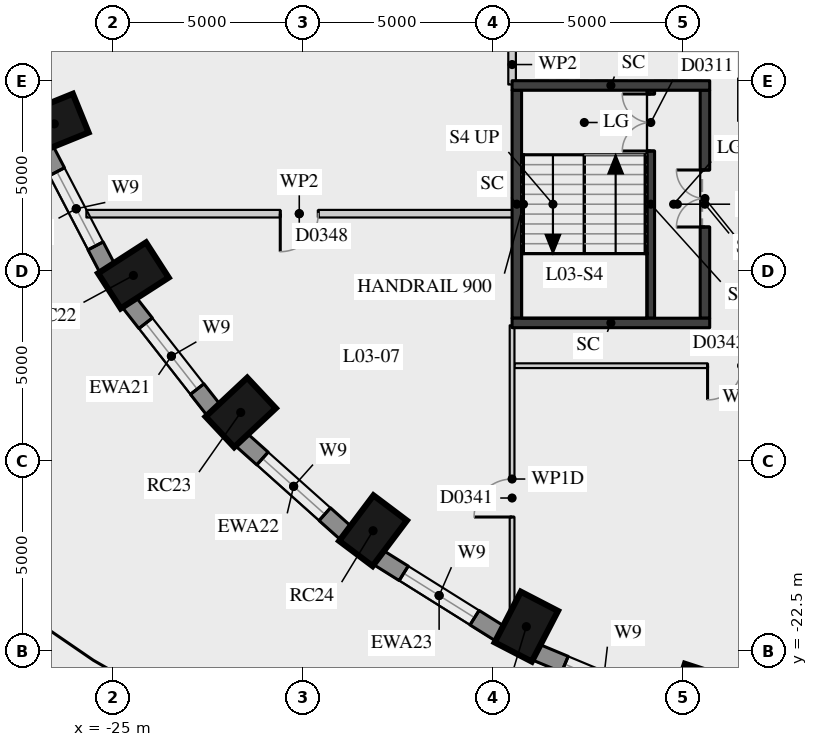
"""IFC4 building model, lengths in metres.
Left out: names, types, materials, properties, quantities, classifications, styles, units other than length and angle.
Written with IfcOpenShell. Run it as: python <this file> out.ifc"""

import sys

from ifc_helpers import new_model, si_unit, direction, frame, frame_2d, origin, origin_2d, place, context, subcontext, project, spatial, rectangle, extrude, element, fill, save


model = new_model("IFC4")
c1 = context("Model", 3, precision=1e-05, world=origin(), true_north=direction((0.0, 1.0)))
c2 = subcontext(c1, "Body", "Model", "MODEL_VIEW")
j1 = project(units=[si_unit("LENGTHUNIT", "METRE"), si_unit("PLANEANGLEUNIT", "RADIAN")], contexts=[c1])
p1 = place(None, origin())
s1 = spatial("IfcSite", under=j1, at=p1, CompositionType="ELEMENT")
p2 = place(p1, origin())
s2 = spatial("IfcBuilding", under=s1, at=p2, CompositionType="ELEMENT")
p3 = place(p2, frame((0.0, 0.0, 17.5)))
s3 = spatial("IfcBuildingStorey", under=s2, at=p3, CompositionType="ELEMENT", Elevation=17.5)
for number, where, z_axis, x_axis in (
    (1, (-26.546, -8.636, 0.0), (0.0, 0.0, 1.0), (-0.927, -0.376, 0.0)),
    (2, (-24.465, -12.625, 0.0), (0.0, 0.0, 1.0), (-0.841, -0.541, 0.0)),
    (3, (-21.641, -16.23, 0.0), (0.0, 0.0, 1.0), (-0.73, -0.683, 0.0)),
    (4, (-18.159, -19.343, 0.0), (0.0, 0.0, 1.0), (-0.601, -0.799, 0.0)),
    (5, (-14.125, -21.867, 0.0), (0.0, 0.0, 1.0), (-0.46, -0.888, 0.0)),
    (6, (-9.662, -23.727, 0.0), (0.0, 0.0, 1.0), (-0.31, -0.951, 0.0)),
):
    element("IfcColumn", number, at=place(p3, frame(where, z_axis=z_axis, x_axis=x_axis)), inside=s3, PredefinedType="COLUMN", context=c2, shape_type="SweptSolid", body=[
        extrude(rectangle(XDim=1.5, YDim=1.1, at=origin_2d()), origin(), (0.0, 0.0, 1.0), 4.2),
    ])
p4 = place(p3, frame((-26.786, -9.305, 0.0), z_axis=(0.0, 0.0, 1.0), x_axis=(0.462492775226, -0.886623050041, 0.0)))
e7 = element("IfcWall", 7, at=p4, inside=s3, PredefinedType="SOLIDWALL", context=c2, shape_type="SweptSolid", body=[
    extrude(rectangle(XDim=3.532, YDim=0.45, at=frame_2d((1.766, 0.0))), origin(), (0.0, 0.0, 1.0), 3.92),
])
p5 = place(p4, frame((0.666, 0.0, 0.4)))
e8 = element("IfcOpeningElement", 8, at=p5, cuts=e7, PredefinedType="OPENING", context=c2, shape_type="SweptSolid", body=[
    extrude(rectangle(XDim=2.2, YDim=2.8, at=frame_2d((1.1, 1.4))), frame((0.0, 0.235, 0.0), z_axis=(0.0, -1.0, 0.0), x_axis=(1.0, 0.0, 0.0)), (0.0, 0.0, 1.0), 0.47),
])
p6 = place(p3, frame((-24.578, -13.328, 0.0), z_axis=(0.0, 0.0, 1.0), x_axis=(0.616661975264, -0.787228053529, 0.0)))
e9 = element("IfcWall", 9, at=p6, inside=s3, PredefinedType="SOLIDWALL", context=c2, shape_type="SweptSolid", body=[
    extrude(rectangle(XDim=3.61, YDim=0.45, at=frame_2d((1.805, 0.0))), origin(), (0.0, 0.0, 1.0), 3.92),
])
p7 = place(p6, frame((0.705, 0.0, 0.4)))
e10 = element("IfcOpeningElement", 10, at=p7, cuts=e9, PredefinedType="OPENING", context=c2, shape_type="SweptSolid", body=[
    extrude(rectangle(XDim=2.2, YDim=2.8, at=frame_2d((1.1, 1.4))), frame((0.0, 0.235, 0.0), z_axis=(0.0, -1.0, 0.0), x_axis=(1.0, 0.0, 0.0)), (0.0, 0.0, 1.0), 0.47),
])
p8 = place(p3, frame((-21.627, -16.943, 0.0), z_axis=(0.0, 0.0, 1.0), x_axis=(0.745526233716, -0.66647628228, 0.0)))
e11 = element("IfcWall", 11, at=p8, inside=s3, PredefinedType="SOLIDWALL", context=c2, shape_type="SweptSolid", body=[
    extrude(rectangle(XDim=3.697, YDim=0.45, at=frame_2d((1.848, 0.0))), origin(), (0.0, 0.0, 1.0), 3.92),
])
p9 = place(p8, frame((0.749, 0.0, 0.4)))
e12 = element("IfcOpeningElement", 12, at=p9, cuts=e11, PredefinedType="OPENING", context=c2, shape_type="SweptSolid", body=[
    extrude(rectangle(XDim=2.2, YDim=2.8, at=frame_2d((1.1, 1.4))), frame((0.0, 0.235, 0.0), z_axis=(0.0, -1.0, 0.0), x_axis=(1.0, 0.0, 0.0)), (0.0, 0.0, 1.0), 0.47),
])
p10 = place(p3, frame((-18.023, -20.044, 0.0), z_axis=(0.0, 0.0, 1.0), x_axis=(0.847635480093, -0.530579016629, 0.0)))
e13 = element("IfcWall", 13, at=p10, inside=s3, PredefinedType="SOLIDWALL", context=c2, shape_type="SweptSolid", body=[
    extrude(rectangle(XDim=3.782, YDim=0.45, at=frame_2d((1.891, 0.0))), origin(), (0.0, 0.0, 1.0), 3.92),
])
p11 = place(p10, frame((0.791, 0.0, 0.4)))
e14 = element("IfcOpeningElement", 14, at=p11, cuts=e13, PredefinedType="OPENING", context=c2, shape_type="SweptSolid", body=[
    extrude(rectangle(XDim=2.2, YDim=2.8, at=frame_2d((1.1, 1.4))), frame((0.0, 0.235, 0.0), z_axis=(0.0, -1.0, 0.0), x_axis=(1.0, 0.0, 0.0)), (0.0, 0.0, 1.0), 0.47),
])
p12 = place(p3, frame((-13.875, -22.537, 0.0), z_axis=(0.0, 0.0, 1.0), x_axis=(0.923031964282, -0.384723267966, 0.0)))
e15 = element("IfcWall", 15, at=p12, inside=s3, PredefinedType="SOLIDWALL", context=c2, shape_type="SweptSolid", body=[
    extrude(rectangle(XDim=3.856, YDim=0.45, at=frame_2d((1.928, 0.0))), origin(), (0.0, 0.0, 1.0), 3.92),
])
p13 = place(p12, frame((0.828, 0.0, 0.4)))
e16 = element("IfcOpeningElement", 16, at=p13, cuts=e15, PredefinedType="OPENING", context=c2, shape_type="SweptSolid", body=[
    extrude(rectangle(XDim=2.2, YDim=2.8, at=frame_2d((1.1, 1.4))), frame((0.0, 0.235, 0.0), z_axis=(0.0, -1.0, 0.0), x_axis=(1.0, 0.0, 0.0)), (0.0, 0.0, 1.0), 0.47),
])
p14 = place(p3, frame((-10.85, -13.75, 0.0), z_axis=(0.0, 0.0, 1.0), x_axis=(0.0, 1.0, 0.0)))
e17 = element("IfcWall", 17, at=p14, inside=s3, PredefinedType="SHEAR", context=c2, shape_type="SweptSolid", body=[
    extrude(rectangle(XDim=6.0, YDim=0.2, at=frame_2d((3.0, 0.0))), origin(), (0.0, 0.0, 1.0), 3.92),
])
p15 = place(p14, frame((4.4, 0.0, 0.0)))
e18 = element("IfcOpeningElement", 18, at=p15, cuts=e17, PredefinedType="OPENING", context=c2, shape_type="SweptSolid", body=[
    extrude(rectangle(XDim=1.5, YDim=2.1, at=frame_2d((0.75, 1.05))), frame((0.0, 0.11, 0.0), z_axis=(0.0, -1.0, 0.0), x_axis=(1.0, 0.0, 0.0)), (0.0, 0.0, 1.0), 0.22),
])
p16 = place(p3, frame((-14.375, -13.75, -0.35), z_axis=(0.0, 0.0, 1.0), x_axis=(0.0, 1.0, 0.0)))
e19 = element("IfcWall", 19, at=p16, inside=s3, PredefinedType="SHEAR", context=c2, shape_type="SweptSolid", body=[
    extrude(rectangle(XDim=6.0, YDim=0.25, at=frame_2d((3.0, 0.0))), origin(), (0.0, 0.0, 1.0), 4.27),
])
p17 = place(p3, frame((-9.425, -13.75, -0.35), z_axis=(0.0, 0.0, 1.0), x_axis=(0.0, 1.0, 0.0)))
e20 = element("IfcWall", 20, at=p17, inside=s3, PredefinedType="SHEAR", context=c2, shape_type="SweptSolid", body=[
    extrude(rectangle(XDim=6.0, YDim=0.25, at=frame_2d((3.0, 0.0))), origin(), (0.0, 0.0, 1.0), 4.27),
])
p18 = place(p17, frame((2.4, 0.0, 0.35)))
e21 = element("IfcOpeningElement", 21, at=p18, cuts=e20, PredefinedType="OPENING", context=c2, shape_type="SweptSolid", body=[
    extrude(rectangle(XDim=1.5, YDim=2.1, at=frame_2d((0.75, 1.05))), frame((0.0, 0.135, 0.0), z_axis=(0.0, -1.0, 0.0), x_axis=(1.0, 0.0, 0.0)), (0.0, 0.0, 1.0), 0.27),
])
for number, where, z_axis, x_axis in (
    (22, (-14.5, -7.625, -0.35), (0.0, 0.0, 1.0), (1.0, 0.0, 0.0)),
    (23, (-14.5, -13.875, -0.35), (0.0, 0.0, 1.0), (1.0, 0.0, 0.0)),
):
    element("IfcWall", number, at=place(p3, frame(where, z_axis=z_axis, x_axis=x_axis)), inside=s3, PredefinedType="SHEAR", context=c2, shape_type="SweptSolid", body=[
        extrude(rectangle(XDim=5.2, YDim=0.25, at=frame_2d((2.6, 0.0))), origin(), (0.0, 0.0, 1.0), 4.27),
    ])
p19 = place(p3, frame((-14.438, -15.0, 0.0), z_axis=(0.0, 0.0, 1.0), x_axis=(1.0, 0.0, 0.0)))
e24 = element("IfcWall", 24, at=p19, inside=s3, PredefinedType="PARTITIONING", context=c2, shape_type="SweptSolid", body=[
    extrude(rectangle(XDim=11.962, YDim=0.125, at=frame_2d((5.981, 0.0))), origin(), (0.0, 0.0, 1.0), 3.92),
])
p20 = place(p19, frame((5.082, 0.0, 0.0)))
e25 = element("IfcOpeningElement", 25, at=p20, cuts=e24, PredefinedType="OPENING", context=c2, shape_type="SweptSolid", body=[
    extrude(rectangle(XDim=1.8, YDim=2.1, at=frame_2d((0.9, 1.05))), frame((0.0, 0.073, 0.0), z_axis=(0.0, -1.0, 0.0), x_axis=(1.0, 0.0, 0.0)), (0.0, 0.0, 1.0), 0.145),
])
p21 = place(p3, frame((-25.702, -11.0, 0.0), z_axis=(0.0, 0.0, 1.0), x_axis=(1.0, 0.0, 0.0)))
e26 = element("IfcWall", 26, at=p21, inside=s3, PredefinedType="PARTITIONING", context=c2, shape_type="SweptSolid", body=[
    extrude(rectangle(XDim=11.204, YDim=0.2, at=frame_2d((5.602, 0.0))), origin(), (0.0, 0.0, 1.0), 3.92),
])
p22 = place(p21, frame((5.102, 0.0, 0.0)))
e27 = element("IfcOpeningElement", 27, at=p22, cuts=e26, PredefinedType="OPENING", context=c2, shape_type="SweptSolid", body=[
    extrude(rectangle(XDim=1.0, YDim=2.1, at=frame_2d((0.5, 1.05))), frame((0.0, 0.11, 0.0), z_axis=(0.0, -1.0, 0.0), x_axis=(1.0, 0.0, 0.0)), (0.0, 0.0, 1.0), 0.22),
])
p23 = place(p3, frame((-14.5, -22.027, 0.0), z_axis=(0.0, 0.0, 1.0), x_axis=(0.0, 1.0, 0.0)))
e28 = element("IfcWall", 28, at=p23, inside=s3, PredefinedType="PARTITIONING", context=c2, shape_type="SweptSolid", body=[
    extrude(rectangle(XDim=8.089, YDim=0.125, at=frame_2d((4.045, 0.0))), origin(), (0.0, 0.0, 1.0), 3.47),
])
p24 = place(p23, frame((3.045, 0.0, 0.0)))
e29 = element("IfcOpeningElement", 29, at=p24, cuts=e28, PredefinedType="OPENING", context=c2, shape_type="SweptSolid", body=[
    extrude(rectangle(XDim=1.0, YDim=2.1, at=frame_2d((0.5, 1.05))), frame((0.0, 0.073, 0.0), z_axis=(0.0, -1.0, 0.0), x_axis=(1.0, 0.0, 0.0)), (0.0, 0.0, 1.0), 0.145),
])
p25 = place(p3, frame((-14.5, -7.6, 0.0), z_axis=(0.0, 0.0, 1.0), x_axis=(0.0, 1.0, 0.0)))
e30 = element("IfcWall", 30, at=p25, inside=s3, PredefinedType="PARTITIONING", context=c2, shape_type="SweptSolid", body=[
    extrude(rectangle(XDim=1.05, YDim=0.2, at=frame_2d((0.525, 0.0))), origin(), (0.0, 0.0, 1.0), 3.92),
])
p26 = place(p5, origin())
e31 = element("IfcWindow", 31, at=p26, inside=s3, PartitioningType="SINGLE_PANEL", PredefinedType="WINDOW", context=c2, shape_type="SweptSolid", body=[
    extrude(rectangle(XDim=2.2, YDim=2.8, at=frame_2d((1.1, 1.4))), frame((0.0, 0.035, 0.0), z_axis=(0.0, -1.0, 0.0), x_axis=(1.0, 0.0, 0.0)), (0.0, 0.0, 1.0), 0.06),
])
fill(e8, e31)
p27 = place(p7, origin())
e32 = element("IfcWindow", 32, at=p27, inside=s3, PartitioningType="SINGLE_PANEL", PredefinedType="WINDOW", context=c2, shape_type="SweptSolid", body=[
    extrude(rectangle(XDim=2.2, YDim=2.8, at=frame_2d((1.1, 1.4))), frame((0.0, 0.035, 0.0), z_axis=(0.0, -1.0, 0.0), x_axis=(1.0, 0.0, 0.0)), (0.0, 0.0, 1.0), 0.06),
])
fill(e10, e32)
p28 = place(p9, origin())
e33 = element("IfcWindow", 33, at=p28, inside=s3, PartitioningType="SINGLE_PANEL", PredefinedType="WINDOW", context=c2, shape_type="SweptSolid", body=[
    extrude(rectangle(XDim=2.2, YDim=2.8, at=frame_2d((1.1, 1.4))), frame((0.0, 0.035, 0.0), z_axis=(0.0, -1.0, 0.0), x_axis=(1.0, 0.0, 0.0)), (0.0, 0.0, 1.0), 0.06),
])
fill(e12, e33)
p29 = place(p11, origin())
e34 = element("IfcWindow", 34, at=p29, inside=s3, PartitioningType="SINGLE_PANEL", PredefinedType="WINDOW", context=c2, shape_type="SweptSolid", body=[
    extrude(rectangle(XDim=2.2, YDim=2.8, at=frame_2d((1.1, 1.4))), frame((0.0, 0.035, 0.0), z_axis=(0.0, -1.0, 0.0), x_axis=(1.0, 0.0, 0.0)), (0.0, 0.0, 1.0), 0.06),
])
fill(e14, e34)
p30 = place(p13, origin())
e35 = element("IfcWindow", 35, at=p30, inside=s3, PartitioningType="SINGLE_PANEL", PredefinedType="WINDOW", context=c2, shape_type="SweptSolid", body=[
    extrude(rectangle(XDim=2.2, YDim=2.8, at=frame_2d((1.1, 1.4))), frame((0.0, 0.035, 0.0), z_axis=(0.0, -1.0, 0.0), x_axis=(1.0, 0.0, 0.0)), (0.0, 0.0, 1.0), 0.06),
])
fill(e16, e35)
p31 = place(p15, origin())
e36 = element("IfcDoor", 36, at=p31, inside=s3, OperationType="DOUBLE_DOOR_SINGLE_SWING", PredefinedType="DOOR", context=c2, shape_type="SweptSolid", body=[
    extrude(rectangle(XDim=1.5, YDim=2.1, at=frame_2d((0.75, 1.05))), frame((0.0, 0.025, 0.0), z_axis=(0.0, -1.0, 0.0), x_axis=(1.0, 0.0, 0.0)), (0.0, 0.0, 1.0), 0.05),
])
fill(e18, e36)
p32 = place(p18, origin())
e37 = element("IfcDoor", 37, at=p32, inside=s3, OperationType="DOUBLE_DOOR_SINGLE_SWING", PredefinedType="DOOR", context=c2, shape_type="SweptSolid", body=[
    extrude(rectangle(XDim=1.5, YDim=2.1, at=frame_2d((0.75, 1.05))), frame((0.0, 0.025, 0.0), z_axis=(0.0, -1.0, 0.0), x_axis=(1.0, 0.0, 0.0)), (0.0, 0.0, 1.0), 0.05),
])
fill(e21, e37)
p33 = place(p22, origin())
e38 = element("IfcDoor", 38, at=p33, inside=s3, OperationType="SINGLE_SWING_RIGHT", PredefinedType="DOOR", context=c2, shape_type="SweptSolid", body=[
    extrude(rectangle(XDim=1.0, YDim=2.1, at=frame_2d((0.5, 1.05))), frame((0.0, 0.025, 0.0), z_axis=(0.0, -1.0, 0.0), x_axis=(1.0, 0.0, 0.0)), (0.0, 0.0, 1.0), 0.05),
])
fill(e27, e38)
p34 = place(p24, origin())
e39 = element("IfcDoor", 39, at=p34, inside=s3, OperationType="SINGLE_SWING_LEFT", PredefinedType="DOOR", context=c2, shape_type="SweptSolid", body=[
    extrude(rectangle(XDim=1.0, YDim=2.1, at=frame_2d((0.5, 1.05))), frame((0.0, 0.025, 0.0), z_axis=(0.0, -1.0, 0.0), x_axis=(1.0, 0.0, 0.0)), (0.0, 0.0, 1.0), 0.05),
])
fill(e29, e39)
p35 = place(p20, origin())
e40 = element("IfcDoor", 40, at=p35, inside=s3, OperationType="DOUBLE_DOOR_SINGLE_SWING", PredefinedType="DOOR", context=c2, shape_type="SweptSolid", body=[
    extrude(rectangle(XDim=1.8, YDim=2.1, at=frame_2d((0.9, 1.05))), frame((0.0, 0.025, 0.0), z_axis=(0.0, -1.0, 0.0), x_axis=(1.0, 0.0, 0.0)), (0.0, 0.0, 1.0), 0.05),
])
fill(e25, e40)
save(model, sys.argv[1])
